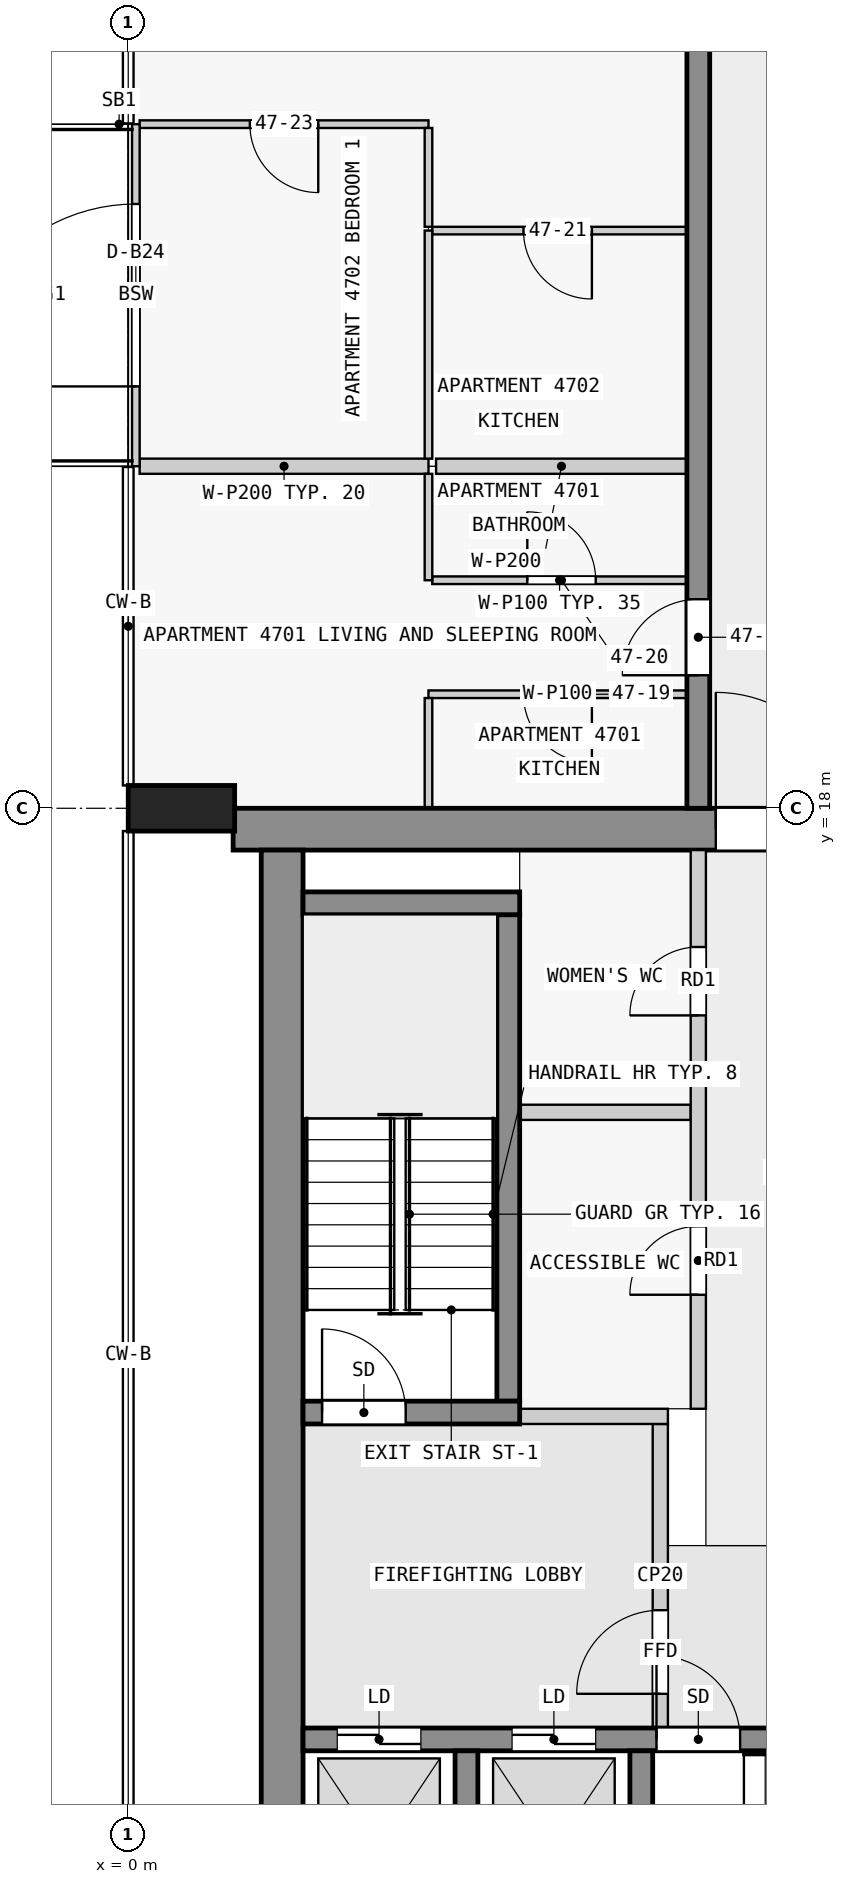
"""IFC4 building model, lengths in metres.
Left out: names, types, materials, properties, quantities, classifications, styles, units other than length and angle.
Written with IfcOpenShell. Run it as: python <this file> out.ifc"""

import sys

from ifc_helpers import new_model, si_unit, direction, frame, frame_2d, origin, origin_2d, place, context, subcontext, project, spatial, rectangle, extrude, element, fill, save


model = new_model("IFC4")
c1 = context("Model", 3, precision=1e-05, world=origin(), true_north=direction((0.0, 1.0)))
c2 = subcontext(c1, "Body", "Model", "MODEL_VIEW")
j1 = project(units=[si_unit("LENGTHUNIT", "METRE"), si_unit("PLANEANGLEUNIT", "RADIAN")], contexts=[c1])
p1 = place(None, origin())
s1 = spatial("IfcSite", under=j1, at=p1, CompositionType="ELEMENT")
p2 = place(p1, origin())
s2 = spatial("IfcBuilding", under=s1, at=p2, CompositionType="ELEMENT")
p3 = place(p2, frame((0.0, 0.0, 181.4)))
s3 = spatial("IfcBuildingStorey", under=s2, at=p3, CompositionType="ELEMENT", Elevation=181.4)
p4 = place(p3, frame((0.7, 18.0, 0.0), z_axis=(0.0, 0.0, 1.0), x_axis=(0.0, 1.0, 0.0)))
e1 = element("IfcColumn", 1, at=p4, inside=s3, PredefinedType="COLUMN", context=c2, shape_type="SweptSolid", body=[
    extrude(rectangle(XDim=0.6, YDim=1.4, at=origin_2d()), origin(), (0.0, 0.0, 1.0), 3.5),
])
p5 = place(p3, frame((1.38, 17.725, 0.0), z_axis=(0.0, 0.0, 1.0), x_axis=(1.0, 0.0, 0.0)))
e2 = element("IfcWall", 2, at=p5, inside=s3, PredefinedType="SHEAR", context=c2, shape_type="SweptSolid", body=[
    extrude(rectangle(XDim=21.12, YDim=0.55, at=frame_2d((10.56, 0.0))), origin(), (0.0, 0.0, 1.0), 3.2),
])
p6 = place(p5, frame((6.35, 0.0, 0.0)))
e3 = element("IfcOpeningElement", 3, at=p6, cuts=e2, PredefinedType="OPENING", context=c2, shape_type="SweptSolid", body=[
    extrude(rectangle(XDim=1.8, YDim=2.1, at=frame_2d((0.9, 1.05))), frame((0.0, 0.285, 0.0), z_axis=(0.0, -1.0, 0.0), x_axis=(1.0, 0.0, 0.0)), (0.0, 0.0, 1.0), 0.57),
])
p7 = place(p3, frame((2.025, 2.5, 0.0), z_axis=(0.0, 0.0, 1.0), x_axis=(0.0, 1.0, 0.0)))
e4 = element("IfcWall", 4, at=p7, inside=s3, PredefinedType="SHEAR", context=c2, shape_type="SweptSolid", body=[
    extrude(rectangle(XDim=14.95, YDim=0.55, at=frame_2d((7.475, 0.0))), origin(), (0.0, 0.0, 1.0), 3.2),
])
for number, where, z_axis, x_axis in (
    (5, (4.45, 2.8, 0.0), (0.0, 0.0, 1.0), (0.0, 1.0, 0.0)),
    (6, (6.75, 2.8, 0.0), (0.0, 0.0, 1.0), (0.0, 1.0, 0.0)),
):
    element("IfcWall", number, at=place(p3, frame(where, z_axis=z_axis, x_axis=x_axis)), inside=s3, PredefinedType="SHEAR", context=c2, shape_type="SweptSolid", body=[
        extrude(rectangle(XDim=2.8, YDim=0.3, at=frame_2d((1.4, 0.0))), origin(), (0.0, 0.0, 1.0), 3.2),
    ])
p8 = place(p3, frame((2.3, 5.75, 0.0), z_axis=(0.0, 0.0, 1.0), x_axis=(1.0, 0.0, 0.0)))
e7 = element("IfcWall", 7, at=p8, inside=s3, PredefinedType="SHEAR", context=c2, shape_type="SweptSolid", body=[
    extrude(rectangle(XDim=18.8, YDim=0.3, at=frame_2d((9.4, 0.0))), origin(), (0.0, 0.0, 1.0), 3.2),
])
p9 = place(p8, frame((4.65, 0.0, 0.0)))
e8 = element("IfcOpeningElement", 8, at=p9, cuts=e7, PredefinedType="OPENING", context=c2, shape_type="SweptSolid", body=[
    extrude(rectangle(XDim=1.1, YDim=2.1, at=frame_2d((0.55, 1.05))), frame((0.0, 0.16, 0.0), z_axis=(0.0, -1.0, 0.0), x_axis=(1.0, 0.0, 0.0)), (0.0, 0.0, 1.0), 0.32),
])
p10 = place(p8, frame((0.45, 0.0, 0.0)))
e9 = element("IfcOpeningElement", 9, at=p10, cuts=e7, PredefinedType="OPENING", context=c2, shape_type="SweptSolid", body=[
    extrude(rectangle(XDim=1.1, YDim=2.1, at=frame_2d((0.55, 1.05))), frame((0.0, 0.16, 0.0), z_axis=(0.0, -1.0, 0.0), x_axis=(1.0, 0.0, 0.0)), (0.0, 0.0, 1.0), 0.32),
])
p11 = place(p8, frame((2.75, 0.0, 0.0)))
e10 = element("IfcOpeningElement", 10, at=p11, cuts=e7, PredefinedType="OPENING", context=c2, shape_type="SweptSolid", body=[
    extrude(rectangle(XDim=1.1, YDim=2.1, at=frame_2d((0.55, 1.05))), frame((0.0, 0.16, 0.0), z_axis=(0.0, -1.0, 0.0), x_axis=(1.0, 0.0, 0.0)), (0.0, 0.0, 1.0), 0.32),
])
p12 = place(p8, frame((14.45, 0.0, 0.0)))
e11 = element("IfcOpeningElement", 11, at=p12, cuts=e7, PredefinedType="OPENING", context=c2, shape_type="SweptSolid", body=[
    extrude(rectangle(XDim=0.9, YDim=2.1, at=frame_2d((0.45, 1.05))), frame((0.0, 0.16, 0.0), z_axis=(0.0, -1.0, 0.0), x_axis=(1.0, 0.0, 0.0)), (0.0, 0.0, 1.0), 0.32),
])
p13 = place(p3, frame((2.3, 10.05, 0.0), z_axis=(0.0, 0.0, 1.0), x_axis=(1.0, 0.0, 0.0)))
e12 = element("IfcWall", 12, at=p13, inside=s3, PredefinedType="SHEAR", context=c2, shape_type="SweptSolid", body=[
    extrude(rectangle(XDim=2.85, YDim=0.3, at=frame_2d((1.425, 0.0))), origin(), (0.0, 0.0, 1.0), 3.2),
])
p14 = place(p13, frame((0.25, 0.0, 0.0)))
e13 = element("IfcOpeningElement", 13, at=p14, cuts=e12, PredefinedType="OPENING", context=c2, shape_type="SweptSolid", body=[
    extrude(rectangle(XDim=1.1, YDim=2.1, at=frame_2d((0.55, 1.05))), frame((0.0, 0.16, 0.0), z_axis=(0.0, -1.0, 0.0), x_axis=(1.0, 0.0, 0.0)), (0.0, 0.0, 1.0), 0.32),
])
p15 = place(p3, frame((5.0, 10.2, 0.0), z_axis=(0.0, 0.0, 1.0), x_axis=(0.0, 1.0, 0.0)))
e14 = element("IfcWall", 14, at=p15, inside=s3, PredefinedType="SHEAR", context=c2, shape_type="SweptSolid", body=[
    extrude(rectangle(XDim=6.4, YDim=0.3, at=frame_2d((3.2, 0.0))), origin(), (0.0, 0.0, 1.0), 3.2),
])
p16 = place(p3, frame((2.3, 16.75, 0.0), z_axis=(0.0, 0.0, 1.0), x_axis=(1.0, 0.0, 0.0)))
e15 = element("IfcWall", 15, at=p16, inside=s3, PredefinedType="SHEAR", context=c2, shape_type="SweptSolid", body=[
    extrude(rectangle(XDim=2.85, YDim=0.3, at=frame_2d((1.425, 0.0))), origin(), (0.0, 0.0, 1.0), 3.2),
])
p17 = place(p3, frame((7.5, 18.0, 0.0), z_axis=(0.0, 0.0, 1.0), x_axis=(0.0, 1.0, 0.0)))
e16 = element("IfcWall", 16, at=p17, inside=s3, PredefinedType="SHEAR", context=c2, shape_type="SweptSolid", body=[
    extrude(rectangle(XDim=27.0, YDim=0.3, at=frame_2d((13.5, 0.0))), origin(), (0.0, 0.0, 1.0), 3.2),
])
p18 = place(p17, frame((1.75, 0.0, 0.0)))
e17 = element("IfcOpeningElement", 17, at=p18, cuts=e16, PredefinedType="OPENING", context=c2, shape_type="SweptSolid", body=[
    extrude(rectangle(XDim=1.0, YDim=2.1, at=frame_2d((0.5, 1.05))), frame((0.0, 0.16, 0.0), z_axis=(0.0, -1.0, 0.0), x_axis=(1.0, 0.0, 0.0)), (0.0, 0.0, 1.0), 0.32),
])
p19 = place(p17, frame((11.45, 0.0, 0.0)))
e18 = element("IfcOpeningElement", 18, at=p19, cuts=e16, PredefinedType="OPENING", context=c2, shape_type="SweptSolid", body=[
    extrude(rectangle(XDim=1.0, YDim=2.1, at=frame_2d((0.5, 1.05))), frame((0.0, 0.16, 0.0), z_axis=(0.0, -1.0, 0.0), x_axis=(1.0, 0.0, 0.0)), (0.0, 0.0, 1.0), 0.32),
])
p20 = place(p17, frame((19.75, 0.0, 0.0)))
e19 = element("IfcOpeningElement", 19, at=p20, cuts=e16, PredefinedType="OPENING", context=c2, shape_type="SweptSolid", body=[
    extrude(rectangle(XDim=1.0, YDim=2.1, at=frame_2d((0.5, 1.05))), frame((0.0, 0.16, 0.0), z_axis=(0.0, -1.0, 0.0), x_axis=(1.0, 0.0, 0.0)), (0.0, 0.0, 1.0), 0.32),
])
p21 = place(p17, frame((23.25, 0.0, 0.0)))
e20 = element("IfcOpeningElement", 20, at=p21, cuts=e16, PredefinedType="OPENING", context=c2, shape_type="SweptSolid", body=[
    extrude(rectangle(XDim=0.9, YDim=2.1, at=frame_2d((0.45, 1.05))), frame((0.0, 0.16, 0.0), z_axis=(0.0, -1.0, 0.0), x_axis=(1.0, 0.0, 0.0)), (0.0, 0.0, 1.0), 0.32),
])
p22 = place(p17, frame((25.45, 0.0, 0.0)))
e21 = element("IfcOpeningElement", 21, at=p22, cuts=e16, PredefinedType="OPENING", context=c2, shape_type="SweptSolid", body=[
    extrude(rectangle(XDim=1.0, YDim=2.1, at=frame_2d((0.5, 1.05))), frame((0.0, 0.16, 0.0), z_axis=(0.0, -1.0, 0.0), x_axis=(1.0, 0.0, 0.0)), (0.0, 0.0, 1.0), 0.32),
])
p23 = place(p3, frame((0.1, 22.5, 0.0), z_axis=(0.0, 0.0, 1.0), x_axis=(0.0, 1.0, 0.0)))
e22 = element("IfcWall", 22, at=p23, inside=s3, PredefinedType="STANDARD", context=c2, shape_type="SweptSolid", body=[
    extrude(rectangle(XDim=4.5, YDim=0.1, at=frame_2d((2.25, 0.0))), origin(), (0.0, 0.0, 1.0), 3.2),
])
p24 = place(p23, frame((1.05, 0.0, 0.0)))
e23 = element("IfcOpeningElement", 23, at=p24, cuts=e22, PredefinedType="OPENING", context=c2, shape_type="SweptSolid", body=[
    extrude(rectangle(XDim=2.4, YDim=2.4, at=frame_2d((1.2, 1.2))), frame((0.0, 0.06, 0.0), z_axis=(0.0, -1.0, 0.0), x_axis=(1.0, 0.0, 0.0)), (0.0, 0.0, 1.0), 0.12),
])
p25 = place(p3, frame((7.0, 5.9, 0.0), z_axis=(0.0, 0.0, 1.0), x_axis=(0.0, 1.0, 0.0)))
e24 = element("IfcWall", 24, at=p25, inside=s3, PredefinedType="PARTITIONING", context=c2, shape_type="SweptSolid", body=[
    extrude(rectangle(XDim=4.0, YDim=0.2, at=frame_2d((2.0, 0.0))), origin(), (0.0, 0.0, 1.0), 3.2),
])
p26 = place(p25, frame((0.45, 0.0, 0.0)))
e25 = element("IfcOpeningElement", 25, at=p26, cuts=e24, PredefinedType="OPENING", context=c2, shape_type="SweptSolid", body=[
    extrude(rectangle(XDim=1.1, YDim=2.1, at=frame_2d((0.55, 1.05))), frame((0.0, 0.11, 0.0), z_axis=(0.0, -1.0, 0.0), x_axis=(1.0, 0.0, 0.0)), (0.0, 0.0, 1.0), 0.22),
])
p27 = place(p3, frame((5.15, 10.0, 0.0), z_axis=(0.0, 0.0, 1.0), x_axis=(1.0, 0.0, 0.0)))
e26 = element("IfcWall", 26, at=p27, inside=s3, PredefinedType="PARTITIONING", context=c2, shape_type="SweptSolid", body=[
    extrude(rectangle(XDim=1.95, YDim=0.2, at=frame_2d((0.975, 0.0))), origin(), (0.0, 0.0, 1.0), 3.2),
])
p28 = place(p3, frame((7.5, 10.1, 0.0), z_axis=(0.0, 0.0, 1.0), x_axis=(0.0, 1.0, 0.0)))
e27 = element("IfcWall", 27, at=p28, inside=s3, PredefinedType="PARTITIONING", context=c2, shape_type="SweptSolid", body=[
    extrude(rectangle(XDim=7.35, YDim=0.2, at=frame_2d((3.675, 0.0))), origin(), (0.0, 0.0, 1.0), 3.2),
])
p29 = place(p28, frame((1.5, 0.0, 0.0)))
e28 = element("IfcOpeningElement", 28, at=p29, cuts=e27, PredefinedType="OPENING", context=c2, shape_type="SweptSolid", body=[
    extrude(rectangle(XDim=0.9, YDim=2.1, at=frame_2d((0.45, 1.05))), frame((0.0, 0.11, 0.0), z_axis=(0.0, -1.0, 0.0), x_axis=(1.0, 0.0, 0.0)), (0.0, 0.0, 1.0), 0.22),
])
p30 = place(p28, frame((5.175, 0.0, 0.0)))
e29 = element("IfcOpeningElement", 29, at=p30, cuts=e27, PredefinedType="OPENING", context=c2, shape_type="SweptSolid", body=[
    extrude(rectangle(XDim=0.9, YDim=2.1, at=frame_2d((0.45, 1.05))), frame((0.0, 0.11, 0.0), z_axis=(0.0, -1.0, 0.0), x_axis=(1.0, 0.0, 0.0)), (0.0, 0.0, 1.0), 0.22),
])
p31 = place(p3, frame((5.15, 14.0, 0.0), z_axis=(0.0, 0.0, 1.0), x_axis=(1.0, 0.0, 0.0)))
e30 = element("IfcWall", 30, at=p31, inside=s3, PredefinedType="PARTITIONING", context=c2, shape_type="SweptSolid", body=[
    extrude(rectangle(XDim=2.25, YDim=0.2, at=frame_2d((1.125, 0.0))), origin(), (0.0, 0.0, 1.0), 3.2),
])
p32 = place(p3, frame((7.35, 19.5, 0.0), z_axis=(0.0, 0.0, 1.0), x_axis=(-1.0, 0.0, 0.0)))
e31 = element("IfcWall", 31, at=p32, inside=s3, PredefinedType="PARTITIONING", context=c2, shape_type="SweptSolid", body=[
    extrude(rectangle(XDim=3.4, YDim=0.1, at=frame_2d((1.7, 0.0))), origin(), (0.0, 0.0, 1.0), 3.2),
])
p33 = place(p32, frame((1.25, 0.0, 0.0)))
e32 = element("IfcOpeningElement", 32, at=p33, cuts=e31, PredefinedType="OPENING", context=c2, shape_type="SweptSolid", body=[
    extrude(rectangle(XDim=0.9, YDim=2.1, at=frame_2d((0.45, 1.05))), frame((0.0, 0.06, 0.0), z_axis=(0.0, -1.0, 0.0), x_axis=(1.0, 0.0, 0.0)), (0.0, 0.0, 1.0), 0.12),
])
p34 = place(p3, frame((4.0, 21.0, 0.0), z_axis=(0.0, 0.0, 1.0), x_axis=(1.0, 0.0, 0.0)))
e33 = element("IfcWall", 33, at=p34, inside=s3, PredefinedType="PARTITIONING", context=c2, shape_type="SweptSolid", body=[
    extrude(rectangle(XDim=3.35, YDim=0.1, at=frame_2d((1.675, 0.0))), origin(), (0.0, 0.0, 1.0), 3.2),
])
p35 = place(p34, frame((1.25, 0.0, 0.0)))
e34 = element("IfcOpeningElement", 34, at=p35, cuts=e33, PredefinedType="OPENING", context=c2, shape_type="SweptSolid", body=[
    extrude(rectangle(XDim=0.9, YDim=2.1, at=frame_2d((0.45, 1.05))), frame((0.0, 0.06, 0.0), z_axis=(0.0, -1.0, 0.0), x_axis=(1.0, 0.0, 0.0)), (0.0, 0.0, 1.0), 0.12),
])
p36 = place(p3, frame((7.35, 22.5, 0.0), z_axis=(0.0, 0.0, 1.0), x_axis=(-1.0, 0.0, 0.0)))
e35 = element("IfcWall", 35, at=p36, inside=s3, PredefinedType="PARTITIONING", context=c2, shape_type="SweptSolid", body=[
    extrude(rectangle(XDim=3.3, YDim=0.2, at=frame_2d((1.65, 0.0))), origin(), (0.0, 0.0, 1.0), 3.2),
])
p37 = place(p3, frame((0.15, 22.5, 0.0), z_axis=(0.0, 0.0, 1.0), x_axis=(1.0, 0.0, 0.0)))
e36 = element("IfcWall", 36, at=p37, inside=s3, PredefinedType="PARTITIONING", context=c2, shape_type="SweptSolid", body=[
    extrude(rectangle(XDim=3.8, YDim=0.2, at=frame_2d((1.9, 0.0))), origin(), (0.0, 0.0, 1.0), 3.2),
])
p38 = place(p3, frame((7.35, 25.6, 0.0), z_axis=(0.0, 0.0, 1.0), x_axis=(-1.0, 0.0, 0.0)))
e37 = element("IfcWall", 37, at=p38, inside=s3, PredefinedType="PARTITIONING", context=c2, shape_type="SweptSolid", body=[
    extrude(rectangle(XDim=3.35, YDim=0.1, at=frame_2d((1.675, 0.0))), origin(), (0.0, 0.0, 1.0), 3.2),
])
p39 = place(p38, frame((1.25, 0.0, 0.0)))
e38 = element("IfcOpeningElement", 38, at=p39, cuts=e37, PredefinedType="OPENING", context=c2, shape_type="SweptSolid", body=[
    extrude(rectangle(XDim=0.9, YDim=2.1, at=frame_2d((0.45, 1.05))), frame((0.0, 0.06, 0.0), z_axis=(0.0, -1.0, 0.0), x_axis=(1.0, 0.0, 0.0)), (0.0, 0.0, 1.0), 0.12),
])
p40 = place(p3, frame((3.95, 27.0, 0.0), z_axis=(0.0, 0.0, 1.0), x_axis=(-1.0, 0.0, 0.0)))
e39 = element("IfcWall", 39, at=p40, inside=s3, PredefinedType="PARTITIONING", context=c2, shape_type="SweptSolid", body=[
    extrude(rectangle(XDim=3.8, YDim=0.1, at=frame_2d((1.9, 0.0))), origin(), (0.0, 0.0, 1.0), 3.2),
])
p41 = place(p40, frame((1.45, 0.0, 0.0)))
e40 = element("IfcOpeningElement", 40, at=p41, cuts=e39, PredefinedType="OPENING", context=c2, shape_type="SweptSolid", body=[
    extrude(rectangle(XDim=0.9, YDim=2.1, at=frame_2d((0.45, 1.05))), frame((0.0, 0.06, 0.0), z_axis=(0.0, -1.0, 0.0), x_axis=(1.0, 0.0, 0.0)), (0.0, 0.0, 1.0), 0.12),
])
p42 = place(p3, frame((3.95, 19.45, 0.0), z_axis=(0.0, 0.0, 1.0), x_axis=(0.0, -1.0, 0.0)))
e41 = element("IfcWall", 41, at=p42, inside=s3, PredefinedType="PARTITIONING", context=c2, shape_type="SweptSolid", body=[
    extrude(rectangle(XDim=1.45, YDim=0.1, at=frame_2d((0.725, 0.0))), origin(), (0.0, 0.0, 1.0), 3.2),
])
p43 = place(p3, frame((3.95, 22.4, 0.0), z_axis=(0.0, 0.0, 1.0), x_axis=(0.0, -1.0, 0.0)))
e42 = element("IfcWall", 42, at=p43, inside=s3, PredefinedType="PARTITIONING", context=c2, shape_type="SweptSolid", body=[
    extrude(rectangle(XDim=1.4, YDim=0.1, at=frame_2d((0.7, 0.0))), origin(), (0.0, 0.0, 1.0), 3.2),
])
p44 = place(p3, frame((3.95, 25.6, 0.0), z_axis=(0.0, 0.0, 1.0), x_axis=(0.0, -1.0, 0.0)))
e43 = element("IfcWall", 43, at=p44, inside=s3, PredefinedType="PARTITIONING", context=c2, shape_type="SweptSolid", body=[
    extrude(rectangle(XDim=3.0, YDim=0.1, at=frame_2d((1.5, 0.0))), origin(), (0.0, 0.0, 1.0), 3.2),
])
p45 = place(p3, frame((3.95, 25.65, 0.0), z_axis=(0.0, 0.0, 1.0), x_axis=(0.0, 1.0, 0.0)))
e44 = element("IfcWall", 44, at=p45, inside=s3, PredefinedType="PARTITIONING", context=c2, shape_type="SweptSolid", body=[
    extrude(rectangle(XDim=1.3, YDim=0.1, at=frame_2d((0.65, 0.0))), origin(), (0.0, 0.0, 1.0), 3.2),
])
p46 = place(p24, origin())
e45 = element("IfcDoor", 45, at=p46, inside=s3, OperationType="SINGLE_SWING_LEFT", PredefinedType="DOOR", context=c2, shape_type="SweptSolid", body=[
    extrude(rectangle(XDim=2.4, YDim=2.4, at=frame_2d((1.2, 1.2))), frame((0.0, 0.025, 0.0), z_axis=(0.0, -1.0, 0.0), x_axis=(1.0, 0.0, 0.0)), (0.0, 0.0, 1.0), 0.05),
])
fill(e23, e45)
p47 = place(p26, origin())
e46 = element("IfcDoor", 46, at=p47, inside=s3, OperationType="SINGLE_SWING_LEFT", PredefinedType="DOOR", context=c2, shape_type="SweptSolid", body=[
    extrude(rectangle(XDim=1.1, YDim=2.1, at=frame_2d((0.55, 1.05))), frame((0.0, 0.025, 0.0), z_axis=(0.0, -1.0, 0.0), x_axis=(1.0, 0.0, 0.0)), (0.0, 0.0, 1.0), 0.05),
])
fill(e25, e46)
p48 = place(p14, origin())
e47 = element("IfcDoor", 47, at=p48, inside=s3, OperationType="SINGLE_SWING_RIGHT", PredefinedType="DOOR", context=c2, shape_type="SweptSolid", body=[
    extrude(rectangle(XDim=1.1, YDim=2.1, at=frame_2d((0.55, 1.05))), frame((0.0, 0.025, 0.0), z_axis=(0.0, -1.0, 0.0), x_axis=(1.0, 0.0, 0.0)), (0.0, 0.0, 1.0), 0.05),
])
fill(e13, e47)
p49 = place(p9, origin())
e48 = element("IfcDoor", 48, at=p49, inside=s3, OperationType="SINGLE_SWING_LEFT", PredefinedType="DOOR", context=c2, shape_type="SweptSolid", body=[
    extrude(rectangle(XDim=1.1, YDim=2.1, at=frame_2d((0.55, 1.05))), frame((0.0, 0.025, 0.0), z_axis=(0.0, -1.0, 0.0), x_axis=(1.0, 0.0, 0.0)), (0.0, 0.0, 1.0), 0.05),
])
fill(e8, e48)
p50 = place(p10, origin())
e49 = element("IfcDoor", 49, at=p50, inside=s3, OperationType="DOUBLE_DOOR_SLIDING", PredefinedType="DOOR", context=c2, shape_type="SweptSolid", body=[
    extrude(rectangle(XDim=1.1, YDim=2.1, at=frame_2d((0.55, 1.05))), frame((0.0, 0.025, 0.0), z_axis=(0.0, -1.0, 0.0), x_axis=(1.0, 0.0, 0.0)), (0.0, 0.0, 1.0), 0.05),
])
fill(e9, e49)
p51 = place(p11, origin())
e50 = element("IfcDoor", 50, at=p51, inside=s3, OperationType="DOUBLE_DOOR_SLIDING", PredefinedType="DOOR", context=c2, shape_type="SweptSolid", body=[
    extrude(rectangle(XDim=1.1, YDim=2.1, at=frame_2d((0.55, 1.05))), frame((0.0, 0.025, 0.0), z_axis=(0.0, -1.0, 0.0), x_axis=(1.0, 0.0, 0.0)), (0.0, 0.0, 1.0), 0.05),
])
fill(e10, e50)
p52 = place(p6, origin())
e51 = element("IfcDoor", 51, at=p52, inside=s3, OperationType="DOUBLE_DOOR_SINGLE_SWING", PredefinedType="DOOR", context=c2, shape_type="SweptSolid", body=[
    extrude(rectangle(XDim=1.8, YDim=2.1, at=frame_2d((0.9, 1.05))), frame((0.0, 0.025, 0.0), z_axis=(0.0, -1.0, 0.0), x_axis=(1.0, 0.0, 0.0)), (0.0, 0.0, 1.0), 0.05),
])
fill(e3, e51)
p53 = place(p29, origin())
e52 = element("IfcDoor", 52, at=p53, inside=s3, OperationType="SINGLE_SWING_RIGHT", PredefinedType="DOOR", context=c2, shape_type="SweptSolid", body=[
    extrude(rectangle(XDim=0.9, YDim=2.1, at=frame_2d((0.45, 1.05))), frame((0.0, 0.025, 0.0), z_axis=(0.0, -1.0, 0.0), x_axis=(1.0, 0.0, 0.0)), (0.0, 0.0, 1.0), 0.05),
])
fill(e28, e52)
p54 = place(p30, origin())
e53 = element("IfcDoor", 53, at=p54, inside=s3, OperationType="SINGLE_SWING_RIGHT", PredefinedType="DOOR", context=c2, shape_type="SweptSolid", body=[
    extrude(rectangle(XDim=0.9, YDim=2.1, at=frame_2d((0.45, 1.05))), frame((0.0, 0.025, 0.0), z_axis=(0.0, -1.0, 0.0), x_axis=(1.0, 0.0, 0.0)), (0.0, 0.0, 1.0), 0.05),
])
fill(e29, e53)
p55 = place(p18, origin())
e54 = element("IfcDoor", 54, at=p55, inside=s3, OperationType="SINGLE_SWING_LEFT", PredefinedType="DOOR", context=c2, shape_type="SweptSolid", body=[
    extrude(rectangle(XDim=1.0, YDim=2.1, at=frame_2d((0.5, 1.05))), frame((0.0, 0.025, 0.0), z_axis=(0.0, -1.0, 0.0), x_axis=(1.0, 0.0, 0.0)), (0.0, 0.0, 1.0), 0.05),
])
fill(e17, e54)
p56 = place(p33, origin())
e55 = element("IfcDoor", 55, at=p56, inside=s3, OperationType="SINGLE_SWING_RIGHT", PredefinedType="DOOR", context=c2, shape_type="SweptSolid", body=[
    extrude(rectangle(XDim=0.9, YDim=2.1, at=frame_2d((0.45, 1.05))), frame((0.0, 0.025, 0.0), z_axis=(0.0, -1.0, 0.0), x_axis=(1.0, 0.0, 0.0)), (0.0, 0.0, 1.0), 0.05),
])
fill(e32, e55)
p57 = place(p35, origin())
e56 = element("IfcDoor", 56, at=p57, inside=s3, OperationType="SINGLE_SWING_RIGHT", PredefinedType="DOOR", context=c2, shape_type="SweptSolid", body=[
    extrude(rectangle(XDim=0.9, YDim=2.1, at=frame_2d((0.45, 1.05))), frame((0.0, 0.025, 0.0), z_axis=(0.0, -1.0, 0.0), x_axis=(1.0, 0.0, 0.0)), (0.0, 0.0, 1.0), 0.05),
])
fill(e34, e56)
p58 = place(p39, origin())
e57 = element("IfcDoor", 57, at=p58, inside=s3, OperationType="SINGLE_SWING_RIGHT", PredefinedType="DOOR", context=c2, shape_type="SweptSolid", body=[
    extrude(rectangle(XDim=0.9, YDim=2.1, at=frame_2d((0.45, 1.05))), frame((0.0, 0.025, 0.0), z_axis=(0.0, -1.0, 0.0), x_axis=(1.0, 0.0, 0.0)), (0.0, 0.0, 1.0), 0.05),
])
fill(e38, e57)
p59 = place(p41, origin())
e58 = element("IfcDoor", 58, at=p59, inside=s3, OperationType="SINGLE_SWING_LEFT", PredefinedType="DOOR", context=c2, shape_type="SweptSolid", body=[
    extrude(rectangle(XDim=0.9, YDim=2.1, at=frame_2d((0.45, 1.05))), frame((0.0, 0.025, 0.0), z_axis=(0.0, -1.0, 0.0), x_axis=(1.0, 0.0, 0.0)), (0.0, 0.0, 1.0), 0.05),
])
fill(e40, e58)
save(model, sys.argv[1])
